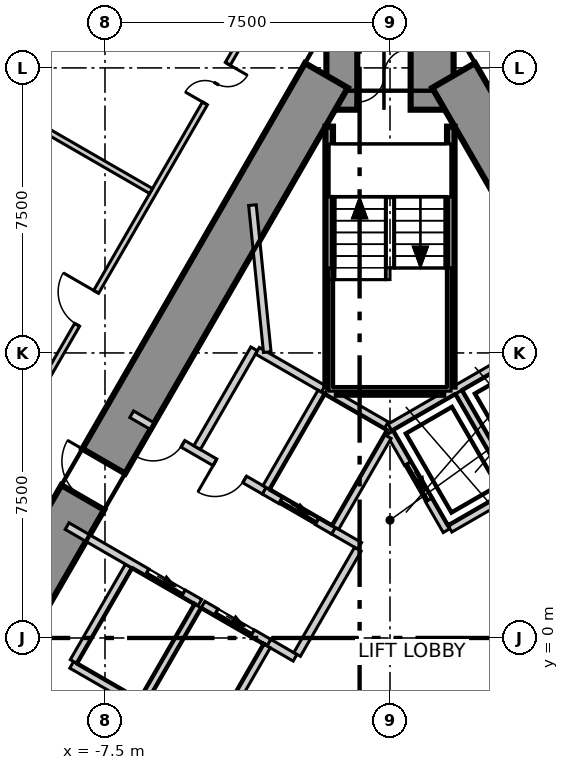
"""IFC4 building model, lengths in metres.
Left out: names, types, materials, properties, quantities, classifications, styles, units other than length and angle.
Written with IfcOpenShell. Run it as: python <this file> out.ifc"""

import sys

from ifc_helpers import new_model, si_unit, direction, frame, frame_2d, origin, place, context, subcontext, project, spatial, polyline, rectangle, outline, extrude, element, fill, save


model = new_model("IFC4")
c1 = context("Model", 3, precision=1e-05, world=origin(), true_north=direction((0.0, 1.0)))
c2 = subcontext(c1, "Body", "Model", "MODEL_VIEW")
j1 = project(units=[si_unit("LENGTHUNIT", "METRE"), si_unit("PLANEANGLEUNIT", "RADIAN")], contexts=[c1])
p1 = place(None, origin())
s1 = spatial("IfcSite", under=j1, at=p1, CompositionType="ELEMENT")
p2 = place(p1, origin())
s2 = spatial("IfcBuilding", under=s1, at=p2, CompositionType="ELEMENT")
p3 = place(p2, frame((0.0, 0.0, 99.8)))
s3 = spatial("IfcBuildingStorey", under=s2, at=p3, CompositionType="ELEMENT", Elevation=99.8)
p4 = place(p3, frame((1.674, 14.8, -0.6), z_axis=(0.0, 0.0, 1.0), x_axis=(-1.0, 0.0, 0.0)))
e1 = element("IfcWall", 1, at=p4, inside=s3, PredefinedType="SHEAR", context=c2, shape_type="SweptSolid", body=[
    extrude(outline(polyline([(-0.231, -0.9), (1.674, -0.9), (3.579, -0.9), (3.117, 0.9), (1.674, 0.9), (0.231, 0.9), (-0.231, -0.9)])), origin(), (0.0, 0.0, 1.0), 4.8),
])
p5 = place(p4, frame((1.133, 0.0, 0.6)))
e2 = element("IfcOpeningElement", 2, at=p5, cuts=e1, PredefinedType="OPENING", context=c2, shape_type="SweptSolid", body=[
    extrude(rectangle(XDim=1.4, YDim=2.1, at=frame_2d((0.7, 1.05))), frame((0.0, 0.91, 0.0), z_axis=(0.0, -1.0, 0.0), x_axis=(1.0, 0.0, 0.0)), (0.0, 0.0, 1.0), 1.82),
])
p6 = place(p3, frame((-1.674, 14.8, -0.6), z_axis=(0.0, 0.0, 1.0), x_axis=(-0.499998822509, -0.866026083608, 0.0)))
e3 = element("IfcWall", 3, at=p6, inside=s3, PredefinedType="SHEAR", context=c2, shape_type="SweptSolid", body=[
    extrude(outline(polyline([(-0.664, -0.65), (1.281, -0.65), (3.226, -0.65), (5.172, -0.65), (7.117, -0.65), (9.062, -0.65), (11.007, -0.65), (12.953, -0.65), (14.898, -0.65), (16.843, -0.65), (18.788, -0.65), (20.734, -0.65), (22.679, -0.65), (24.624, -0.65), (23.296, 0.65), (21.41, 0.65), (19.524, 0.65), (17.638, 0.65), (15.752, 0.65), (13.866, 0.65), (11.98, 0.65), (10.094, 0.65), (8.208, 0.65), (6.322, 0.65), (4.436, 0.65), (2.55, 0.65), (0.664, 0.65), (-0.664, -0.65)])), origin(), (0.0, 0.0, 1.0), 4.8),
])
p7 = place(p6, frame((11.719, 0.0, 0.6)))
e4 = element("IfcOpeningElement", 4, at=p7, cuts=e3, PredefinedType="OPENING", context=c2, shape_type="SweptSolid", body=[
    extrude(rectangle(XDim=1.1, YDim=2.1, at=frame_2d((0.55, 1.05))), frame((0.0, 0.66, 0.0), z_axis=(0.0, -1.0, 0.0), x_axis=(1.0, 0.0, 0.0)), (0.0, 0.0, 1.0), 1.32),
])
p8 = place(p3, frame((13.654, -5.95, -0.6), z_axis=(0.0, 0.0, 1.0), x_axis=(-0.499998822509, 0.866026083608, 0.0)))
e5 = element("IfcWall", 5, at=p8, inside=s3, PredefinedType="SHEAR", context=c2, shape_type="SweptSolid", body=[
    extrude(outline(polyline([(-0.664, -0.65), (1.281, -0.65), (3.226, -0.65), (5.172, -0.65), (7.117, -0.65), (9.062, -0.65), (11.007, -0.65), (12.953, -0.65), (14.898, -0.65), (16.843, -0.65), (18.788, -0.65), (20.734, -0.65), (22.679, -0.65), (24.624, -0.65), (23.296, 0.65), (21.41, 0.65), (19.524, 0.65), (17.638, 0.65), (15.752, 0.65), (13.866, 0.65), (11.98, 0.65), (10.094, 0.65), (8.208, 0.65), (6.322, 0.65), (4.436, 0.65), (2.55, 0.65), (0.664, 0.65), (-0.664, -0.65)])), origin(), (0.0, 0.0, 1.0), 4.8),
])
p9 = place(p8, frame((11.369, 0.0, 0.6)))
e6 = element("IfcOpeningElement", 6, at=p9, cuts=e5, PredefinedType="OPENING", context=c2, shape_type="SweptSolid", body=[
    extrude(rectangle(XDim=1.8, YDim=2.1, at=frame_2d((0.9, 1.05))), frame((0.0, 0.66, 0.0), z_axis=(0.0, -1.0, 0.0), x_axis=(1.0, 0.0, 0.0)), (0.0, 0.0, 1.0), 1.32),
])
p10 = place(p3, frame((-3.217, 35.882, 0.0), z_axis=(0.0, 0.0, 1.0), x_axis=(-0.499995323711, -0.866028103624, 0.0)))
e7 = element("IfcWall", 7, at=p10, inside=s3, PredefinedType="ELEMENTEDWALL", context=c2, shape_type="SweptSolid", body=[
    extrude(rectangle(XDim=58.913, YDim=0.2, at=frame_2d((29.456, 0.0))), origin(), (0.0, 0.0, 1.0), 4.2),
])
p11 = place(p10, frame((2.023, 0.0, 0.6)))
e8 = element("IfcOpeningElement", 8, at=p11, cuts=e7, PredefinedType="OPENING", context=c2, shape_type="SweptSolid", body=[
    extrude(rectangle(XDim=5.6, YDim=3.0, at=frame_2d((2.8, 1.5))), frame((0.0, 0.11, 0.0), z_axis=(0.0, -1.0, 0.0), x_axis=(1.0, 0.0, 0.0)), (0.0, 0.0, 1.0), 0.22),
])
p12 = place(p10, frame((9.064, 0.0, 0.6)))
e9 = element("IfcOpeningElement", 9, at=p12, cuts=e7, PredefinedType="OPENING", context=c2, shape_type="SweptSolid", body=[
    extrude(rectangle(XDim=5.6, YDim=3.0, at=frame_2d((2.8, 1.5))), frame((0.0, 0.11, 0.0), z_axis=(0.0, -1.0, 0.0), x_axis=(1.0, 0.0, 0.0)), (0.0, 0.0, 1.0), 0.22),
])
p13 = place(p10, frame((16.105, 0.0, 0.6)))
e10 = element("IfcOpeningElement", 10, at=p13, cuts=e7, PredefinedType="OPENING", context=c2, shape_type="SweptSolid", body=[
    extrude(rectangle(XDim=5.6, YDim=3.0, at=frame_2d((2.8, 1.5))), frame((0.0, 0.11, 0.0), z_axis=(0.0, -1.0, 0.0), x_axis=(1.0, 0.0, 0.0)), (0.0, 0.0, 1.0), 0.22),
])
p14 = place(p10, frame((23.146, 0.0, 0.6)))
e11 = element("IfcOpeningElement", 11, at=p14, cuts=e7, PredefinedType="OPENING", context=c2, shape_type="SweptSolid", body=[
    extrude(rectangle(XDim=5.6, YDim=3.0, at=frame_2d((2.8, 1.5))), frame((0.0, 0.11, 0.0), z_axis=(0.0, -1.0, 0.0), x_axis=(1.0, 0.0, 0.0)), (0.0, 0.0, 1.0), 0.22),
])
p15 = place(p10, frame((30.186, 0.0, 0.6)))
e12 = element("IfcOpeningElement", 12, at=p15, cuts=e7, PredefinedType="OPENING", context=c2, shape_type="SweptSolid", body=[
    extrude(rectangle(XDim=5.6, YDim=3.0, at=frame_2d((2.8, 1.5))), frame((0.0, 0.11, 0.0), z_axis=(0.0, -1.0, 0.0), x_axis=(1.0, 0.0, 0.0)), (0.0, 0.0, 1.0), 0.22),
])
p16 = place(p10, frame((37.227, 0.0, 0.6)))
e13 = element("IfcOpeningElement", 13, at=p16, cuts=e7, PredefinedType="OPENING", context=c2, shape_type="SweptSolid", body=[
    extrude(rectangle(XDim=5.6, YDim=3.0, at=frame_2d((2.8, 1.5))), frame((0.0, 0.11, 0.0), z_axis=(0.0, -1.0, 0.0), x_axis=(1.0, 0.0, 0.0)), (0.0, 0.0, 1.0), 0.22),
])
p17 = place(p10, frame((44.268, 0.0, 0.6)))
e14 = element("IfcOpeningElement", 14, at=p17, cuts=e7, PredefinedType="OPENING", context=c2, shape_type="SweptSolid", body=[
    extrude(rectangle(XDim=5.6, YDim=3.0, at=frame_2d((2.8, 1.5))), frame((0.0, 0.11, 0.0), z_axis=(0.0, -1.0, 0.0), x_axis=(1.0, 0.0, 0.0)), (0.0, 0.0, 1.0), 0.22),
])
p18 = place(p10, frame((51.309, 0.0, 0.6)))
e15 = element("IfcOpeningElement", 15, at=p18, cuts=e7, PredefinedType="OPENING", context=c2, shape_type="SweptSolid", body=[
    extrude(rectangle(XDim=5.6, YDim=3.0, at=frame_2d((2.8, 1.5))), frame((0.0, 0.11, 0.0), z_axis=(0.0, -1.0, 0.0), x_axis=(1.0, 0.0, 0.0)), (0.0, 0.0, 1.0), 0.22),
])
p19 = place(p3, frame((-16.57, -6.2, 0.0), z_axis=(0.0, 0.0, 1.0), x_axis=(0.499993827443, 0.866028967483, 0.0)))
e16 = element("IfcWall", 16, at=p19, inside=s3, PredefinedType="PARTITIONING", context=c2, shape_type="SweptSolid", body=[
    extrude(rectangle(XDim=27.308, YDim=0.15, at=frame_2d((13.654, 0.0))), origin(), (0.0, 0.0, 1.0), 4.2),
])
p20 = place(p19, frame((23.402, 0.0, 0.0)))
e17 = element("IfcOpeningElement", 17, at=p20, cuts=e16, PredefinedType="OPENING", context=c2, shape_type="SweptSolid", body=[
    extrude(rectangle(XDim=1.2, YDim=2.1, at=frame_2d((0.6, 1.05))), frame((0.0, 0.085, 0.0), z_axis=(0.0, -1.0, 0.0), x_axis=(1.0, 0.0, 0.0)), (0.0, 0.0, 1.0), 0.17),
])
p21 = place(p19, frame((16.675, 0.0, 0.0)))
e18 = element("IfcOpeningElement", 18, at=p21, cuts=e16, PredefinedType="OPENING", context=c2, shape_type="SweptSolid", body=[
    extrude(rectangle(XDim=1.0, YDim=2.1, at=frame_2d((0.5, 1.05))), frame((0.0, 0.085, 0.0), z_axis=(0.0, -1.0, 0.0), x_axis=(1.0, 0.0, 0.0)), (0.0, 0.0, 1.0), 0.17),
])
p22 = place(p19, frame((9.634, 0.0, 0.0)))
e19 = element("IfcOpeningElement", 19, at=p22, cuts=e16, PredefinedType="OPENING", context=c2, shape_type="SweptSolid", body=[
    extrude(rectangle(XDim=1.0, YDim=2.1, at=frame_2d((0.5, 1.05))), frame((0.0, 0.085, 0.0), z_axis=(0.0, -1.0, 0.0), x_axis=(1.0, 0.0, 0.0)), (0.0, 0.0, 1.0), 0.17),
])
p23 = place(p19, frame((2.707, 0.0, 0.0)))
e20 = element("IfcOpeningElement", 20, at=p23, cuts=e16, PredefinedType="OPENING", context=c2, shape_type="SweptSolid", body=[
    extrude(rectangle(XDim=1.2, YDim=2.1, at=frame_2d((0.6, 1.05))), frame((0.0, 0.085, 0.0), z_axis=(0.0, -1.0, 0.0), x_axis=(1.0, 0.0, 0.0)), (0.0, 0.0, 1.0), 0.17),
])
p24 = place(p3, frame((-14.429, 16.461, 0.0), z_axis=(0.0, 0.0, 1.0), x_axis=(0.866014767649, -0.500018421874, 0.0)))
e21 = element("IfcWall", 21, at=p24, inside=s3, PredefinedType="PARTITIONING", context=c2, shape_type="SweptSolid", body=[
    extrude(rectangle(XDim=9.402, YDim=0.15, at=frame_2d((4.701, 0.0))), origin(), (0.0, 0.0, 1.0), 4.2),
])
p25 = place(p3, frame((-8.376, -0.707, 0.0), z_axis=(0.0, 0.0, 1.0), x_axis=(0.866067520717, -0.499927044236, 0.0)))
e22 = element("IfcWall", 22, at=p25, inside=s3, PredefinedType="SOLIDWALL", context=c2, shape_type="SweptSolid", body=[
    extrude(rectangle(XDim=2.1, YDim=0.2, at=frame_2d((1.05, 0.0))), origin(), (0.0, 0.0, 1.0), 4.2),
])
p26 = place(p3, frame((-8.326, -0.62, 0.0), z_axis=(0.0, 0.0, 1.0), x_axis=(0.500023687443, 0.866011727401, 0.0)))
e23 = element("IfcWall", 23, at=p26, inside=s3, PredefinedType="SOLIDWALL", context=c2, shape_type="SweptSolid", body=[
    extrude(rectangle(XDim=2.9, YDim=0.2, at=frame_2d((1.45, 0.0))), origin(), (0.0, 0.0, 1.0), 4.2),
])
p27 = place(p3, frame((-0.002, 5.541, 0.0), z_axis=(0.0, 0.0, 1.0), x_axis=(0.86600155993, 0.500041296494, 0.0)))
e24 = element("IfcWall", 24, at=p27, inside=s3, PredefinedType="SOLIDWALL", context=c2, shape_type="SweptSolid", body=[
    extrude(rectangle(XDim=4.132, YDim=0.2, at=frame_2d((2.066, 0.0))), origin(), (0.0, 0.0, 1.0), 4.2),
])
p28 = place(p3, frame((0.0, 5.4, 0.0), z_axis=(0.0, 0.0, 1.0), x_axis=(0.500103862429, -0.865965430478, 0.0)))
e25 = element("IfcWall", 25, at=p28, inside=s3, PredefinedType="SOLIDWALL", context=c2, shape_type="SweptSolid", body=[
    extrude(rectangle(XDim=2.973, YDim=0.2, at=frame_2d((1.487, 0.0))), origin(), (0.0, 0.0, 1.0), 4.2),
])
p29 = place(p28, frame((0.937, 0.0, 0.0)))
e26 = element("IfcOpeningElement", 26, at=p29, cuts=e25, PredefinedType="OPENING", context=c2, shape_type="SweptSolid", body=[
    extrude(rectangle(XDim=1.1, YDim=2.1, at=frame_2d((0.55, 1.05))), frame((0.0, 0.11, 0.0), z_axis=(0.0, -1.0, 0.0), x_axis=(1.0, 0.0, 0.0)), (0.0, 0.0, 1.0), 0.22),
])
p30 = place(p3, frame((1.578, 2.874, 0.0), z_axis=(0.0, 0.0, 1.0), x_axis=(0.866053365281, 0.49995156614, 0.0)))
e27 = element("IfcWall", 27, at=p30, inside=s3, PredefinedType="SOLIDWALL", context=c2, shape_type="SweptSolid", body=[
    extrude(rectangle(XDim=6.026, YDim=0.2, at=frame_2d((3.013, 0.0))), origin(), (0.0, 0.0, 1.0), 4.2),
])
p31 = place(p30, frame((2.496, 0.0, 0.0)))
e28 = element("IfcOpeningElement", 28, at=p31, cuts=e27, PredefinedType="OPENING", context=c2, shape_type="SweptSolid", body=[
    extrude(rectangle(XDim=1.1, YDim=2.1, at=frame_2d((0.55, 1.05))), frame((0.0, 0.11, 0.0), z_axis=(0.0, -1.0, 0.0), x_axis=(1.0, 0.0, 0.0)), (0.0, 0.0, 1.0), 0.22),
])
p32 = place(p30, frame((4.471, 0.0, 0.0)))
e29 = element("IfcOpeningElement", 29, at=p32, cuts=e27, PredefinedType="OPENING", context=c2, shape_type="SweptSolid", body=[
    extrude(rectangle(XDim=0.9, YDim=2.1, at=frame_2d((0.45, 1.05))), frame((0.0, 0.11, 0.0), z_axis=(0.0, -1.0, 0.0), x_axis=(1.0, 0.0, 0.0)), (0.0, 0.0, 1.0), 0.22),
])
p33 = place(p3, frame((1.807, 6.47, 0.0), z_axis=(0.0, 0.0, 1.0), x_axis=(0.50012328804, -0.865954211699, 0.0)))
e30 = element("IfcWall", 30, at=p33, inside=s3, PredefinedType="SOLIDWALL", context=c2, shape_type="SweptSolid", body=[
    extrude(rectangle(XDim=2.9, YDim=0.2, at=frame_2d((1.45, 0.0))), origin(), (0.0, 0.0, 1.0), 4.2),
])
p34 = place(p3, frame((-8.497, 2.943, 0.0), z_axis=(0.0, 0.0, 1.0), x_axis=(0.866036368755, -0.499981007633, 0.0)))
e31 = element("IfcWall", 31, at=p34, inside=s3, PredefinedType="SOLIDWALL", context=c2, shape_type="SweptSolid", body=[
    extrude(rectangle(XDim=4.032, YDim=0.2, at=frame_2d((2.016, 0.0))), origin(), (0.0, 0.0, 1.0), 4.2),
])
p35 = place(p34, frame((2.43, 0.0, 0.0)))
e32 = element("IfcOpeningElement", 32, at=p35, cuts=e31, PredefinedType="OPENING", context=c2, shape_type="SweptSolid", body=[
    extrude(rectangle(XDim=1.1, YDim=2.1, at=frame_2d((0.55, 1.05))), frame((0.0, 0.11, 0.0), z_axis=(0.0, -1.0, 0.0), x_axis=(1.0, 0.0, 0.0)), (0.0, 0.0, 1.0), 0.22),
])
p36 = place(p3, frame((-3.188, -0.122, 0.0), z_axis=(0.0, 0.0, 1.0), x_axis=(0.865705793592, -0.50055317294, 0.0)))
e33 = element("IfcWall", 33, at=p36, inside=s3, PredefinedType="SOLIDWALL", context=c2, shape_type="SweptSolid", body=[
    extrude(rectangle(XDim=0.797, YDim=0.2, at=frame_2d((0.398, 0.0))), origin(), (0.0, 0.0, 1.0), 4.2),
])
p37 = place(p3, frame((-6.797, 5.887, 0.0), z_axis=(0.0, 0.0, 1.0), x_axis=(0.866062584469, -0.499935595635, 0.0)))
e34 = element("IfcWall", 34, at=p37, inside=s3, PredefinedType="SOLIDWALL", context=c2, shape_type="SweptSolid", body=[
    extrude(rectangle(XDim=4.032, YDim=0.2, at=frame_2d((2.016, 0.0))), origin(), (0.0, 0.0, 1.0), 4.2),
])
p38 = place(p37, frame((2.53, 0.0, 0.0)))
e35 = element("IfcOpeningElement", 35, at=p38, cuts=e34, PredefinedType="OPENING", context=c2, shape_type="SweptSolid", body=[
    extrude(rectangle(XDim=0.9, YDim=2.1, at=frame_2d((0.45, 1.05))), frame((0.0, 0.11, 0.0), z_axis=(0.0, -1.0, 0.0), x_axis=(1.0, 0.0, 0.0)), (0.0, 0.0, 1.0), 0.22),
])
p39 = place(p37, frame((0.655, 0.0, 0.0)))
e36 = element("IfcOpeningElement", 36, at=p39, cuts=e34, PredefinedType="OPENING", context=c2, shape_type="SweptSolid", body=[
    extrude(rectangle(XDim=0.9, YDim=2.1, at=frame_2d((0.45, 1.05))), frame((0.0, 0.11, 0.0), z_axis=(0.0, -1.0, 0.0), x_axis=(1.0, 0.0, 0.0)), (0.0, 0.0, 1.0), 0.22),
])
p40 = place(p3, frame((-1.488, 2.822, 0.0), z_axis=(0.0, 0.0, 1.0), x_axis=(0.866236612152, -0.499633997809, 0.0)))
e37 = element("IfcWall", 37, at=p40, inside=s3, PredefinedType="SOLIDWALL", context=c2, shape_type="SweptSolid", body=[
    extrude(rectangle(XDim=0.796, YDim=0.2, at=frame_2d((0.398, 0.0))), origin(), (0.0, 0.0, 1.0), 4.2),
])
p41 = place(p3, frame((-5.076, 5.009, 0.0), z_axis=(0.0, 0.0, 1.0), x_axis=(0.50002537861, 0.866010750942, 0.0)))
e38 = element("IfcWall", 38, at=p41, inside=s3, PredefinedType="SOLIDWALL", context=c2, shape_type="SweptSolid", body=[
    extrude(rectangle(XDim=3.0, YDim=0.2, at=frame_2d((1.5, 0.0))), origin(), (0.0, 0.0, 1.0), 4.2),
])
p42 = place(p3, frame((-3.489, 7.557, 0.0), z_axis=(0.0, 0.0, 1.0), x_axis=(0.866010750942, -0.50002537861, 0.0)))
e39 = element("IfcWall", 39, at=p42, inside=s3, PredefinedType="SOLIDWALL", context=c2, shape_type="SweptSolid", body=[
    extrude(rectangle(XDim=2.0, YDim=0.2, at=frame_2d((1.0, 0.0))), origin(), (0.0, 0.0, 1.0), 4.2),
])
p43 = place(p3, frame((-2.444, -0.433, 0.0), z_axis=(0.0, 0.0, 1.0), x_axis=(0.500035624827, 0.866004834804, 0.0)))
e40 = element("IfcWall", 40, at=p43, inside=s3, PredefinedType="SOLIDWALL", context=c2, shape_type="SweptSolid", body=[
    extrude(rectangle(XDim=3.194, YDim=0.2, at=frame_2d((1.597, 0.0))), origin(), (0.0, 0.0, 1.0), 4.2),
])
p44 = place(p3, frame((-6.507, -1.67, 0.0), z_axis=(0.0, 0.0, 1.0), x_axis=(0.50012328804, 0.865954211699, 0.0)))
e41 = element("IfcWall", 41, at=p44, inside=s3, PredefinedType="SOLIDWALL", context=c2, shape_type="SweptSolid", body=[
    extrude(rectangle(XDim=2.9, YDim=0.2, at=frame_2d((1.45, 0.0))), origin(), (0.0, 0.0, 1.0), 4.2),
])
p45 = place(p3, frame((-4.92, 0.878, 0.0), z_axis=(0.0, 0.0, 1.0), x_axis=(0.866010750942, -0.50002537861, 0.0)))
e42 = element("IfcWall", 42, at=p45, inside=s3, PredefinedType="SOLIDWALL", context=c2, shape_type="SweptSolid", body=[
    extrude(rectangle(XDim=2.0, YDim=0.2, at=frame_2d((1.0, 0.0))), origin(), (0.0, 0.0, 1.0), 4.2),
])
p46 = place(p45, frame((0.4, 0.0, 0.0)))
e43 = element("IfcOpeningElement", 43, at=p46, cuts=e42, PredefinedType="OPENING", context=c2, shape_type="SweptSolid", body=[
    extrude(rectangle(XDim=1.1, YDim=2.1, at=frame_2d((0.55, 1.05))), frame((0.0, 0.11, 0.0), z_axis=(0.0, -1.0, 0.0), x_axis=(1.0, 0.0, 0.0)), (0.0, 0.0, 1.0), 0.22),
])
p47 = place(p3, frame((-4.619, -2.6, 0.0), z_axis=(0.0, 0.0, 1.0), x_axis=(0.50009492287, 0.865970593103, 0.0)))
e44 = element("IfcWall", 44, at=p47, inside=s3, PredefinedType="SOLIDWALL", context=c2, shape_type="SweptSolid", body=[
    extrude(rectangle(XDim=2.761, YDim=0.2, at=frame_2d((1.381, 0.0))), origin(), (0.0, 0.0, 1.0), 4.2),
])
p48 = place(p3, frame((-3.309, 3.873, 0.0), z_axis=(0.0, 0.0, 1.0), x_axis=(0.866098583652, -0.499873227325, 0.0)))
e45 = element("IfcWall", 45, at=p48, inside=s3, PredefinedType="SOLIDWALL", context=c2, shape_type="SweptSolid", body=[
    extrude(rectangle(XDim=2.103, YDim=0.2, at=frame_2d((1.051, 0.0))), origin(), (0.0, 0.0, 1.0), 4.2),
])
p49 = place(p48, frame((0.502, 0.0, 0.0)))
e46 = element("IfcOpeningElement", 46, at=p49, cuts=e45, PredefinedType="OPENING", context=c2, shape_type="SweptSolid", body=[
    extrude(rectangle(XDim=1.1, YDim=2.1, at=frame_2d((0.55, 1.05))), frame((0.0, 0.11, 0.0), z_axis=(0.0, -1.0, 0.0), x_axis=(1.0, 0.0, 0.0)), (0.0, 0.0, 1.0), 0.22),
])
p50 = place(p3, frame((-3.257, 3.959, 0.0), z_axis=(0.0, 0.0, 1.0), x_axis=(0.50012328804, 0.865954211699, 0.0)))
e47 = element("IfcWall", 47, at=p50, inside=s3, PredefinedType="SOLIDWALL", context=c2, shape_type="SweptSolid", body=[
    extrude(rectangle(XDim=2.9, YDim=0.2, at=frame_2d((1.45, 0.0))), origin(), (0.0, 0.0, 1.0), 4.2),
])
p51 = place(p3, frame((-1.67, 6.507, 0.0), z_axis=(0.0, 0.0, 1.0), x_axis=(0.865941441609, -0.500145398563, 0.0)))
e48 = element("IfcWall", 48, at=p51, inside=s3, PredefinedType="SOLIDWALL", context=c2, shape_type="SweptSolid", body=[
    extrude(rectangle(XDim=1.815, YDim=0.2, at=frame_2d((0.908, 0.0))), origin(), (0.0, 0.0, 1.0), 4.2),
])
p52 = place(p3, frame((-1.438, 2.909, 0.0), z_axis=(0.0, 0.0, 1.0), x_axis=(0.499829630636, 0.866123744241, 0.0)))
e49 = element("IfcWall", 49, at=p52, inside=s3, PredefinedType="SOLIDWALL", context=c2, shape_type="SweptSolid", body=[
    extrude(rectangle(XDim=2.761, YDim=0.2, at=frame_2d((1.38, 0.0))), origin(), (0.0, 0.0, 1.0), 4.2),
])
p53 = place(p3, frame((-3.62, 11.389, 0.0), z_axis=(0.0, 0.0, 1.0), x_axis=(0.100405723382, -0.994946576813, 0.0)))
e50 = element("IfcWall", 50, at=p53, inside=s3, PredefinedType="SOLIDWALL", context=c2, shape_type="SweptSolid", body=[
    extrude(rectangle(XDim=3.885, YDim=0.2, at=frame_2d((1.943, 0.0))), origin(), (0.0, 0.0, 1.0), 4.2),
])
p54 = place(p3, frame((1.6, 6.615, 0.0), z_axis=(0.0, 0.0, 1.0), x_axis=(0.0, 1.0, 0.0)))
e51 = element("IfcWall", 51, at=p54, inside=s3, PredefinedType="SOLIDWALL", context=c2, shape_type="SweptSolid", body=[
    extrude(rectangle(XDim=6.84, YDim=0.2, at=frame_2d((3.42, 0.0))), origin(), (0.0, 0.0, 1.0), 4.2),
])
p55 = place(p3, frame((-1.4, 6.5, 0.0), z_axis=(0.0, 0.0, 1.0), x_axis=(1.0, 0.0, 0.0)))
e52 = element("IfcWall", 52, at=p55, inside=s3, PredefinedType="SOLIDWALL", context=c2, shape_type="SweptSolid", body=[
    extrude(rectangle(XDim=2.8, YDim=0.2, at=frame_2d((1.4, 0.0))), origin(), (0.0, 0.0, 1.0), 4.2),
])
p56 = place(p3, frame((-1.6, 6.615, 0.0), z_axis=(0.0, 0.0, 1.0), x_axis=(0.0, 1.0, 0.0)))
e53 = element("IfcWall", 53, at=p56, inside=s3, PredefinedType="SOLIDWALL", context=c2, shape_type="SweptSolid", body=[
    extrude(rectangle(XDim=6.84, YDim=0.2, at=frame_2d((3.42, 0.0))), origin(), (0.0, 0.0, 1.0), 4.2),
])
p57 = place(p29, origin())
e54 = element("IfcDoor", 54, at=p57, inside=s3, OperationType="SLIDING_TO_LEFT", PredefinedType="DOOR", context=c2, shape_type="SweptSolid", body=[
    extrude(rectangle(XDim=1.1, YDim=2.1, at=frame_2d((0.55, 1.05))), frame((0.0, 0.025, 0.0), z_axis=(0.0, -1.0, 0.0), x_axis=(1.0, 0.0, 0.0)), (0.0, 0.0, 1.0), 0.05),
])
fill(e26, e54)
p58 = place(p46, origin())
e55 = element("IfcDoor", 55, at=p58, inside=s3, OperationType="SLIDING_TO_LEFT", PredefinedType="DOOR", context=c2, shape_type="SweptSolid", body=[
    extrude(rectangle(XDim=1.1, YDim=2.1, at=frame_2d((0.55, 1.05))), frame((0.0, 0.025, 0.0), z_axis=(0.0, -1.0, 0.0), x_axis=(1.0, 0.0, 0.0)), (0.0, 0.0, 1.0), 0.05),
])
fill(e43, e55)
p59 = place(p49, origin())
e56 = element("IfcDoor", 56, at=p59, inside=s3, OperationType="SLIDING_TO_LEFT", PredefinedType="DOOR", context=c2, shape_type="SweptSolid", body=[
    extrude(rectangle(XDim=1.1, YDim=2.1, at=frame_2d((0.55, 1.05))), frame((0.0, 0.025, 0.0), z_axis=(0.0, -1.0, 0.0), x_axis=(1.0, 0.0, 0.0)), (0.0, 0.0, 1.0), 0.05),
])
fill(e46, e56)
p60 = place(p35, origin())
e57 = element("IfcDoor", 57, at=p60, inside=s3, OperationType="SLIDING_TO_LEFT", PredefinedType="DOOR", context=c2, shape_type="SweptSolid", body=[
    extrude(rectangle(XDim=1.1, YDim=2.1, at=frame_2d((0.55, 1.05))), frame((0.0, 0.025, 0.0), z_axis=(0.0, -1.0, 0.0), x_axis=(1.0, 0.0, 0.0)), (0.0, 0.0, 1.0), 0.05),
])
fill(e32, e57)
p61 = place(p38, origin())
e58 = element("IfcDoor", 58, at=p61, inside=s3, OperationType="SINGLE_SWING_LEFT", PredefinedType="DOOR", context=c2, shape_type="SweptSolid", body=[
    extrude(rectangle(XDim=0.9, YDim=2.1, at=frame_2d((0.45, 1.05))), frame((0.0, 0.025, 0.0), z_axis=(0.0, -1.0, 0.0), x_axis=(1.0, 0.0, 0.0)), (0.0, 0.0, 1.0), 0.05),
])
fill(e35, e58)
p62 = place(p20, origin())
e59 = element("IfcDoor", 59, at=p62, inside=s3, OperationType="DOUBLE_DOOR_SINGLE_SWING", PredefinedType="DOOR", context=c2, shape_type="SweptSolid", body=[
    extrude(rectangle(XDim=1.2, YDim=2.1, at=frame_2d((0.6, 1.05))), frame((0.0, 0.025, 0.0), z_axis=(0.0, -1.0, 0.0), x_axis=(1.0, 0.0, 0.0)), (0.0, 0.0, 1.0), 0.05),
])
fill(e17, e59)
p63 = place(p21, origin())
e60 = element("IfcDoor", 60, at=p63, inside=s3, OperationType="SINGLE_SWING_LEFT", PredefinedType="DOOR", context=c2, shape_type="SweptSolid", body=[
    extrude(rectangle(XDim=1.0, YDim=2.1, at=frame_2d((0.5, 1.05))), frame((0.0, 0.025, 0.0), z_axis=(0.0, -1.0, 0.0), x_axis=(1.0, 0.0, 0.0)), (0.0, 0.0, 1.0), 0.05),
])
fill(e18, e60)
p64 = place(p5, origin())
e61 = element("IfcDoor", 61, at=p64, inside=s3, OperationType="DOUBLE_DOOR_SINGLE_SWING", PredefinedType="DOOR", context=c2, shape_type="SweptSolid", body=[
    extrude(rectangle(XDim=1.4, YDim=2.1, at=frame_2d((0.7, 1.05))), frame((0.0, 0.025, 0.0), z_axis=(0.0, -1.0, 0.0), x_axis=(1.0, 0.0, 0.0)), (0.0, 0.0, 1.0), 0.05),
])
fill(e2, e61)
p65 = place(p7, origin())
e62 = element("IfcDoor", 62, at=p65, inside=s3, OperationType="SINGLE_SWING_LEFT", PredefinedType="DOOR", context=c2, shape_type="SweptSolid", body=[
    extrude(rectangle(XDim=1.1, YDim=2.1, at=frame_2d((0.55, 1.05))), frame((0.0, 0.025, 0.0), z_axis=(0.0, -1.0, 0.0), x_axis=(1.0, 0.0, 0.0)), (0.0, 0.0, 1.0), 0.05),
])
fill(e4, e62)
p66 = place(p39, origin())
e63 = element("IfcDoor", 63, at=p66, inside=s3, OperationType="SINGLE_SWING_LEFT", PredefinedType="DOOR", context=c2, shape_type="SweptSolid", body=[
    extrude(rectangle(XDim=0.9, YDim=2.1, at=frame_2d((0.45, 1.05))), frame((0.0, 0.025, 0.0), z_axis=(0.0, -1.0, 0.0), x_axis=(1.0, 0.0, 0.0)), (0.0, 0.0, 1.0), 0.05),
])
fill(e36, e63)
save(model, sys.argv[1])
